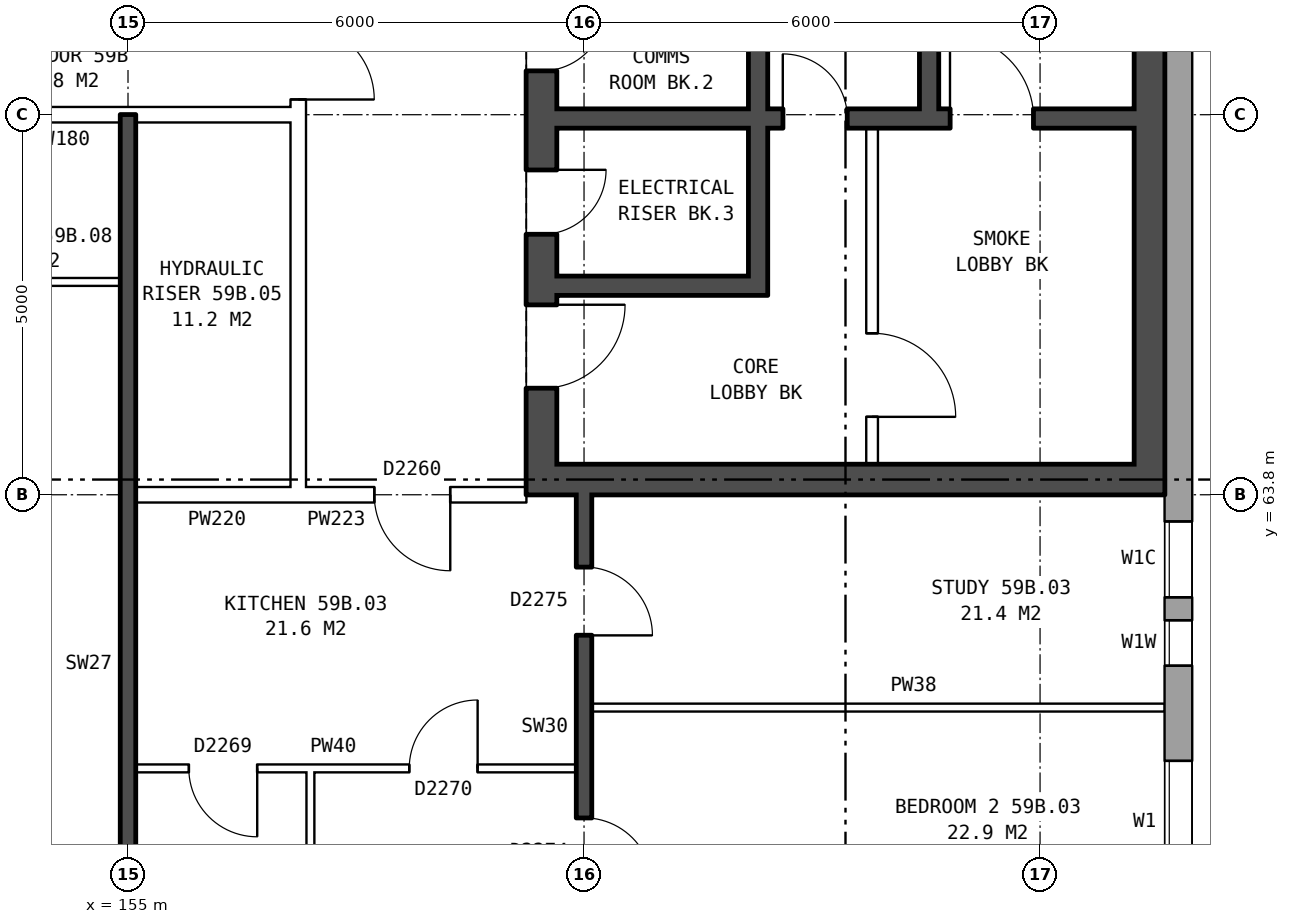
"""IFC4 building model, lengths in metres.
Left out: names, types, materials, properties, quantities, classifications, styles, units other than length and angle.
Written with IfcOpenShell. Run it as: python <this file> out.ifc"""

import sys

from ifc_helpers import new_model, si_unit, direction, frame, frame_2d, origin, place, context, subcontext, project, spatial, rectangle, extrude, element, fill, save


model = new_model("IFC4")
c1 = context("Model", 3, precision=1e-05, world=origin(), true_north=direction((0.0, 1.0)))
c2 = subcontext(c1, "Body", "Model", "MODEL_VIEW")
j1 = project(units=[si_unit("LENGTHUNIT", "METRE"), si_unit("PLANEANGLEUNIT", "RADIAN")], contexts=[c1])
p1 = place(None, origin())
s1 = spatial("IfcSite", under=j1, at=p1, CompositionType="ELEMENT")
p2 = place(p1, origin())
s2 = spatial("IfcBuilding", under=s1, at=p2, CompositionType="ELEMENT")
p3 = place(p2, frame((0.0, 0.0, 209.0)))
s3 = spatial("IfcBuildingStorey", under=s2, at=p3, CompositionType="ELEMENT", Elevation=209.0)
p4 = place(p3, frame((168.82, 57.075, 0.0), z_axis=(0.0, 0.0, 1.0), x_axis=(0.0, 1.0, 0.0)))
e1 = element("IfcWall", 1, at=p4, inside=s3, PredefinedType="STANDARD", context=c2, shape_type="SweptSolid", body=[
    extrude(rectangle(XDim=25.851, YDim=0.36, at=frame_2d((12.925, 0.0))), origin(), (0.0, 0.0, 1.0), 2.85),
])
p5 = place(p4, frame((1.625, 0.0, 0.8)))
e2 = element("IfcOpeningElement", 2, at=p5, cuts=e1, PredefinedType="OPENING", context=c2, shape_type="SweptSolid", body=[
    extrude(rectangle(XDim=1.6, YDim=1.8, at=frame_2d((0.8, 0.9))), frame((0.0, 0.19, 0.0), z_axis=(0.0, -1.0, 0.0), x_axis=(1.0, 0.0, 0.0)), (0.0, 0.0, 1.0), 0.38),
])
p6 = place(p4, frame((4.475, 0.0, 0.15)))
e3 = element("IfcOpeningElement", 3, at=p6, cuts=e1, PredefinedType="OPENING", context=c2, shape_type="SweptSolid", body=[
    extrude(rectangle(XDim=0.6, YDim=0.9, at=frame_2d((0.3, 0.45))), frame((0.0, 0.19, 0.0), z_axis=(0.0, -1.0, 0.0), x_axis=(1.0, 0.0, 0.0)), (0.0, 0.0, 1.0), 0.38),
])
p7 = place(p4, frame((19.425, 0.0, 0.25)))
e4 = element("IfcOpeningElement", 4, at=p7, cuts=e1, PredefinedType="OPENING", context=c2, shape_type="SweptSolid", body=[
    extrude(rectangle(XDim=1.0, YDim=1.8, at=frame_2d((0.5, 0.9))), frame((0.0, 0.19, 0.0), z_axis=(0.0, -1.0, 0.0), x_axis=(1.0, 0.0, 0.0)), (0.0, 0.0, 1.0), 0.38),
])
p8 = place(p4, frame((22.625, 0.0, 0.8)))
e5 = element("IfcOpeningElement", 5, at=p8, cuts=e1, PredefinedType="OPENING", context=c2, shape_type="SweptSolid", body=[
    extrude(rectangle(XDim=1.6, YDim=1.8, at=frame_2d((0.8, 0.9))), frame((0.0, 0.19, 0.0), z_axis=(0.0, -1.0, 0.0), x_axis=(1.0, 0.0, 0.0)), (0.0, 0.0, 1.0), 0.38),
])
p9 = place(p4, frame((5.375, 0.0, 0.15)))
e6 = element("IfcOpeningElement", 6, at=p9, cuts=e1, PredefinedType="OPENING", context=c2, shape_type="SweptSolid", body=[
    extrude(rectangle(XDim=1.0, YDim=1.8, at=frame_2d((0.5, 0.9))), frame((0.0, 0.19, 0.0), z_axis=(0.0, -1.0, 0.0), x_axis=(1.0, 0.0, 0.0)), (0.0, 0.0, 1.0), 0.38),
])
p10 = place(p4, frame((20.725, 0.0, 0.15)))
e7 = element("IfcOpeningElement", 7, at=p10, cuts=e1, PredefinedType="OPENING", context=c2, shape_type="SweptSolid", body=[
    extrude(rectangle(XDim=0.6, YDim=0.9, at=frame_2d((0.3, 0.45))), frame((0.0, 0.19, 0.0), z_axis=(0.0, -1.0, 0.0), x_axis=(1.0, 0.0, 0.0)), (0.0, 0.0, 1.0), 0.38),
])
p11 = place(p3, frame((160.44, 76.2, 0.0), z_axis=(0.0, 0.0, 1.0), x_axis=(0.0, -1.0, 0.0)))
e8 = element("IfcWall", 8, at=p11, inside=s3, PredefinedType="SHEAR", context=c2, shape_type="SweptSolid", body=[
    extrude(rectangle(XDim=12.4, YDim=0.4, at=frame_2d((6.2, 0.0))), origin(), (0.0, 0.0, 1.0), 2.85),
])
p12 = place(p11, frame((1.325, 0.0, 0.0)))
e9 = element("IfcOpeningElement", 9, at=p12, cuts=e8, PredefinedType="OPENING", context=c2, shape_type="SweptSolid", body=[
    extrude(rectangle(XDim=1.1, YDim=2.1, at=frame_2d((0.55, 1.05))), frame((0.0, 0.21, 0.0), z_axis=(0.0, -1.0, 0.0), x_axis=(1.0, 0.0, 0.0)), (0.0, 0.0, 1.0), 0.42),
])
p13 = place(p11, frame((3.825, 0.0, 0.0)))
e10 = element("IfcOpeningElement", 10, at=p13, cuts=e8, PredefinedType="OPENING", context=c2, shape_type="SweptSolid", body=[
    extrude(rectangle(XDim=0.85, YDim=2.1, at=frame_2d((0.425, 1.05))), frame((0.0, 0.21, 0.0), z_axis=(0.0, -1.0, 0.0), x_axis=(1.0, 0.0, 0.0)), (0.0, 0.0, 1.0), 0.42),
])
p14 = place(p11, frame((5.975, 0.0, 0.0)))
e11 = element("IfcOpeningElement", 11, at=p14, cuts=e8, PredefinedType="OPENING", context=c2, shape_type="SweptSolid", body=[
    extrude(rectangle(XDim=0.85, YDim=2.1, at=frame_2d((0.425, 1.05))), frame((0.0, 0.21, 0.0), z_axis=(0.0, -1.0, 0.0), x_axis=(1.0, 0.0, 0.0)), (0.0, 0.0, 1.0), 0.42),
])
p15 = place(p11, frame((9.9, 0.0, 0.0)))
e12 = element("IfcOpeningElement", 12, at=p15, cuts=e8, PredefinedType="OPENING", context=c2, shape_type="SweptSolid", body=[
    extrude(rectangle(XDim=1.1, YDim=2.1, at=frame_2d((0.55, 1.05))), frame((0.0, 0.21, 0.0), z_axis=(0.0, -1.0, 0.0), x_axis=(1.0, 0.0, 0.0)), (0.0, 0.0, 1.0), 0.42),
])
p16 = place(p11, frame((8.125, 0.0, 0.0)))
e13 = element("IfcOpeningElement", 13, at=p16, cuts=e8, PredefinedType="OPENING", context=c2, shape_type="SweptSolid", body=[
    extrude(rectangle(XDim=0.85, YDim=2.1, at=frame_2d((0.425, 1.05))), frame((0.0, 0.21, 0.0), z_axis=(0.0, -1.0, 0.0), x_axis=(1.0, 0.0, 0.0)), (0.0, 0.0, 1.0), 0.42),
])
p17 = place(p3, frame((168.44, 76.2, 0.0), z_axis=(0.0, 0.0, 1.0), x_axis=(0.0, -1.0, 0.0)))
e14 = element("IfcWall", 14, at=p17, inside=s3, PredefinedType="SHEAR", context=c2, shape_type="SweptSolid", body=[
    extrude(rectangle(XDim=12.4, YDim=0.4, at=frame_2d((6.2, 0.0))), origin(), (0.0, 0.0, 1.0), 2.85),
])
p18 = place(p3, frame((160.64, 64.0, 0.0), z_axis=(0.0, 0.0, 1.0), x_axis=(1.0, 0.0, 0.0)))
e15 = element("IfcWall", 15, at=p18, inside=s3, PredefinedType="SHEAR", context=c2, shape_type="SweptSolid", body=[
    extrude(rectangle(XDim=7.6, YDim=0.4, at=frame_2d((3.8, 0.0))), origin(), (0.0, 0.0, 1.0), 2.85),
])
p19 = place(p3, frame((160.64, 68.75, 0.0), z_axis=(0.0, 0.0, 1.0), x_axis=(1.0, 0.0, 0.0)))
e16 = element("IfcWall", 16, at=p19, inside=s3, PredefinedType="SHEAR", context=c2, shape_type="SweptSolid", body=[
    extrude(rectangle(XDim=7.6, YDim=0.25, at=frame_2d((3.8, 0.0))), origin(), (0.0, 0.0, 1.0), 2.85),
])
p20 = place(p19, frame((5.175, 0.0, 0.0)))
e17 = element("IfcOpeningElement", 17, at=p20, cuts=e16, PredefinedType="OPENING", context=c2, shape_type="SweptSolid", body=[
    extrude(rectangle(XDim=1.1, YDim=2.1, at=frame_2d((0.55, 1.05))), frame((0.0, 0.135, 0.0), z_axis=(0.0, -1.0, 0.0), x_axis=(1.0, 0.0, 0.0)), (0.0, 0.0, 1.0), 0.27),
])
p21 = place(p19, frame((2.975, 0.0, 0.0)))
e18 = element("IfcOpeningElement", 18, at=p21, cuts=e16, PredefinedType="OPENING", context=c2, shape_type="SweptSolid", body=[
    extrude(rectangle(XDim=0.85, YDim=2.1, at=frame_2d((0.425, 1.05))), frame((0.0, 0.135, 0.0), z_axis=(0.0, -1.0, 0.0), x_axis=(1.0, 0.0, 0.0)), (0.0, 0.0, 1.0), 0.27),
])
p22 = place(p3, frame((160.64, 66.55, 0.0), z_axis=(0.0, 0.0, 1.0), x_axis=(1.0, 0.0, 0.0)))
e19 = element("IfcWall", 19, at=p22, inside=s3, PredefinedType="SHEAR", context=c2, shape_type="SweptSolid", body=[
    extrude(rectangle(XDim=2.525, YDim=0.25, at=frame_2d((1.263, 0.0))), origin(), (0.0, 0.0, 1.0), 2.85),
])
p23 = place(p3, frame((163.29, 73.025, 0.0), z_axis=(0.0, 0.0, 1.0), x_axis=(0.0, -1.0, 0.0)))
e20 = element("IfcWall", 20, at=p23, inside=s3, PredefinedType="SHEAR", context=c2, shape_type="SweptSolid", body=[
    extrude(rectangle(XDim=4.15, YDim=0.25, at=frame_2d((2.075, 0.0))), origin(), (0.0, 0.0, 1.0), 2.85),
])
p24 = place(p3, frame((163.29, 68.625, 0.0), z_axis=(0.0, 0.0, 1.0), x_axis=(0.0, -1.0, 0.0)))
e21 = element("IfcWall", 21, at=p24, inside=s3, PredefinedType="SHEAR", context=c2, shape_type="SweptSolid", body=[
    extrude(rectangle(XDim=2.2, YDim=0.25, at=frame_2d((1.1, 0.0))), origin(), (0.0, 0.0, 1.0), 2.85),
])
p25 = place(p3, frame((164.79, 68.625, 0.0), z_axis=(0.0, 0.0, 1.0), x_axis=(0.0, -1.0, 0.0)))
e22 = element("IfcWall", 22, at=p25, inside=s3, PredefinedType="PARTITIONING", context=c2, shape_type="SweptSolid", body=[
    extrude(rectangle(XDim=4.425, YDim=0.15, at=frame_2d((2.212, 0.0))), origin(), (0.0, 0.0, 1.0), 2.85),
])
p26 = place(p25, frame((2.7, 0.0, 0.0)))
e23 = element("IfcOpeningElement", 23, at=p26, cuts=e22, PredefinedType="OPENING", context=c2, shape_type="SweptSolid", body=[
    extrude(rectangle(XDim=1.1, YDim=2.1, at=frame_2d((0.55, 1.05))), frame((0.0, 0.085, 0.0), z_axis=(0.0, -1.0, 0.0), x_axis=(1.0, 0.0, 0.0)), (0.0, 0.0, 1.0), 0.17),
])
p27 = place(p3, frame((165.54, 75.8, 0.0), z_axis=(0.0, 0.0, 1.0), x_axis=(0.0, -1.0, 0.0)))
e24 = element("IfcWall", 24, at=p27, inside=s3, PredefinedType="SHEAR", context=c2, shape_type="SweptSolid", body=[
    extrude(rectangle(XDim=6.925, YDim=0.25, at=frame_2d((3.462, 0.0))), origin(), (0.0, 0.0, 1.0), 2.85),
])
p28 = place(p3, frame((157.24, 63.9, 0.0), z_axis=(0.0, 0.0, 1.0), x_axis=(0.0, 1.0, 0.0)))
e25 = element("IfcWall", 25, at=p28, inside=s3, PredefinedType="PARTITIONING", context=c2, shape_type="SweptSolid", body=[
    extrude(rectangle(XDim=12.2, YDim=0.2, at=frame_2d((6.1, 0.0))), origin(), (0.0, 0.0, 1.0), 2.85),
])
p29 = place(p28, frame((5.1, 0.0, 0.0)))
e26 = element("IfcOpeningElement", 26, at=p29, cuts=e25, PredefinedType="OPENING", context=c2, shape_type="SweptSolid", body=[
    extrude(rectangle(XDim=2.0, YDim=2.1, at=frame_2d((1.0, 1.05))), frame((0.0, 0.11, 0.0), z_axis=(0.0, -1.0, 0.0), x_axis=(1.0, 0.0, 0.0)), (0.0, 0.0, 1.0), 0.22),
])
p30 = place(p3, frame((155.1, 60.2, 0.0), z_axis=(0.0, 0.0, 1.0), x_axis=(1.0, 0.0, 0.0)))
e27 = element("IfcWall", 27, at=p30, inside=s3, PredefinedType="PARTITIONING", context=c2, shape_type="SweptSolid", body=[
    extrude(rectangle(XDim=5.8, YDim=0.1, at=frame_2d((2.9, 0.0))), origin(), (0.0, 0.0, 1.0), 2.85),
])
p31 = place(p30, frame((3.6, 0.0, 0.0)))
e28 = element("IfcOpeningElement", 28, at=p31, cuts=e27, PredefinedType="OPENING", context=c2, shape_type="SweptSolid", body=[
    extrude(rectangle(XDim=0.9, YDim=2.1, at=frame_2d((0.45, 1.05))), frame((0.0, 0.06, 0.0), z_axis=(0.0, -1.0, 0.0), x_axis=(1.0, 0.0, 0.0)), (0.0, 0.0, 1.0), 0.12),
])
p32 = place(p30, frame((0.7, 0.0, 0.0)))
e29 = element("IfcOpeningElement", 29, at=p32, cuts=e27, PredefinedType="OPENING", context=c2, shape_type="SweptSolid", body=[
    extrude(rectangle(XDim=0.9, YDim=2.1, at=frame_2d((0.45, 1.05))), frame((0.0, 0.06, 0.0), z_axis=(0.0, -1.0, 0.0), x_axis=(1.0, 0.0, 0.0)), (0.0, 0.0, 1.0), 0.12),
])
p33 = place(p3, frame((161.1, 61.0, 0.0), z_axis=(0.0, 0.0, 1.0), x_axis=(1.0, 0.0, 0.0)))
e30 = element("IfcWall", 30, at=p33, inside=s3, PredefinedType="PARTITIONING", context=c2, shape_type="SweptSolid", body=[
    extrude(rectangle(XDim=7.54, YDim=0.1, at=frame_2d((3.77, 0.0))), origin(), (0.0, 0.0, 1.0), 2.85),
])
p34 = place(p3, frame((155.1, 63.8, 0.0), z_axis=(0.0, 0.0, 1.0), x_axis=(1.0, 0.0, 0.0)))
e31 = element("IfcWall", 31, at=p34, inside=s3, PredefinedType="PARTITIONING", context=c2, shape_type="SweptSolid", body=[
    extrude(rectangle(XDim=2.14, YDim=0.2, at=frame_2d((1.07, 0.0))), origin(), (0.0, 0.0, 1.0), 2.85),
])
p35 = place(p3, frame((157.24, 63.8, 0.0), z_axis=(0.0, 0.0, 1.0), x_axis=(1.0, 0.0, 0.0)))
e32 = element("IfcWall", 32, at=p35, inside=s3, PredefinedType="PARTITIONING", context=c2, shape_type="SweptSolid", body=[
    extrude(rectangle(XDim=3.0, YDim=0.2, at=frame_2d((1.5, 0.0))), origin(), (0.0, 0.0, 1.0), 2.85),
])
p36 = place(p35, frame((1.0, 0.0, 0.0)))
e33 = element("IfcOpeningElement", 33, at=p36, cuts=e32, PredefinedType="OPENING", context=c2, shape_type="SweptSolid", body=[
    extrude(rectangle(XDim=1.0, YDim=2.1, at=frame_2d((0.5, 1.05))), frame((0.0, 0.11, 0.0), z_axis=(0.0, -1.0, 0.0), x_axis=(1.0, 0.0, 0.0)), (0.0, 0.0, 1.0), 0.22),
])
p37 = place(p3, frame((152.0, 66.6, 0.0), z_axis=(0.0, 0.0, 1.0), x_axis=(1.0, 0.0, 0.0)))
e34 = element("IfcWall", 34, at=p37, inside=s3, PredefinedType="PARTITIONING", context=c2, shape_type="SweptSolid", body=[
    extrude(rectangle(XDim=2.9, YDim=0.1, at=frame_2d((1.45, 0.0))), origin(), (0.0, 0.0, 1.0), 2.85),
])
p38 = place(p3, frame((142.76, 68.8, 0.0), z_axis=(0.0, 0.0, 1.0), x_axis=(1.0, 0.0, 0.0)))
e35 = element("IfcWall", 35, at=p38, inside=s3, PredefinedType="PARTITIONING", context=c2, shape_type="SweptSolid", body=[
    extrude(rectangle(XDim=14.48, YDim=0.2, at=frame_2d((7.24, 0.0))), origin(), (0.0, 0.0, 1.0), 2.85),
])
p39 = place(p38, frame((4.24, 0.0, 0.0)))
e36 = element("IfcOpeningElement", 36, at=p39, cuts=e35, PredefinedType="OPENING", context=c2, shape_type="SweptSolid", body=[
    extrude(rectangle(XDim=1.0, YDim=2.1, at=frame_2d((0.5, 1.05))), frame((0.0, 0.11, 0.0), z_axis=(0.0, -1.0, 0.0), x_axis=(1.0, 0.0, 0.0)), (0.0, 0.0, 1.0), 0.22),
])
p40 = place(p38, frame((7.24, 0.0, 0.0)))
e37 = element("IfcOpeningElement", 37, at=p40, cuts=e35, PredefinedType="OPENING", context=c2, shape_type="SweptSolid", body=[
    extrude(rectangle(XDim=1.0, YDim=2.1, at=frame_2d((0.5, 1.05))), frame((0.0, 0.11, 0.0), z_axis=(0.0, -1.0, 0.0), x_axis=(1.0, 0.0, 0.0)), (0.0, 0.0, 1.0), 0.22),
])
p41 = place(p3, frame((155.0, 54.36, 0.0), z_axis=(0.0, 0.0, 1.0), x_axis=(0.0, 1.0, 0.0)))
e38 = element("IfcWall", 38, at=p41, inside=s3, PredefinedType="SOLIDWALL", context=c2, shape_type="SweptSolid", body=[
    extrude(rectangle(XDim=14.44, YDim=0.2, at=frame_2d((7.22, 0.0))), origin(), (0.0, 0.0, 1.0), 2.85),
])
p42 = place(p3, frame((157.4, 57.85, 0.0), z_axis=(0.0, 0.0, 1.0), x_axis=(0.0, 1.0, 0.0)))
e39 = element("IfcWall", 39, at=p42, inside=s3, PredefinedType="PARTITIONING", context=c2, shape_type="SweptSolid", body=[
    extrude(rectangle(XDim=2.3, YDim=0.1, at=frame_2d((1.15, 0.0))), origin(), (0.0, 0.0, 1.0), 2.85),
])
p43 = place(p3, frame((161.0, 54.36, 0.0), z_axis=(0.0, 0.0, 1.0), x_axis=(0.0, 1.0, 0.0)))
e40 = element("IfcWall", 40, at=p43, inside=s3, PredefinedType="SOLIDWALL", context=c2, shape_type="SweptSolid", body=[
    extrude(rectangle(XDim=9.44, YDim=0.2, at=frame_2d((4.72, 0.0))), origin(), (0.0, 0.0, 1.0), 2.85),
])
p44 = place(p43, frame((1.37, 0.0, 0.0)))
e41 = element("IfcOpeningElement", 41, at=p44, cuts=e40, PredefinedType="OPENING", context=c2, shape_type="SweptSolid", body=[
    extrude(rectangle(XDim=0.9, YDim=2.1, at=frame_2d((0.45, 1.05))), frame((0.0, 0.11, 0.0), z_axis=(0.0, -1.0, 0.0), x_axis=(1.0, 0.0, 0.0)), (0.0, 0.0, 1.0), 0.22),
])
p45 = place(p43, frame((4.29, 0.0, 0.0)))
e42 = element("IfcOpeningElement", 42, at=p45, cuts=e40, PredefinedType="OPENING", context=c2, shape_type="SweptSolid", body=[
    extrude(rectangle(XDim=0.9, YDim=2.1, at=frame_2d((0.45, 1.05))), frame((0.0, 0.11, 0.0), z_axis=(0.0, -1.0, 0.0), x_axis=(1.0, 0.0, 0.0)), (0.0, 0.0, 1.0), 0.22),
])
p46 = place(p43, frame((7.59, 0.0, 0.0)))
e43 = element("IfcOpeningElement", 43, at=p46, cuts=e40, PredefinedType="OPENING", context=c2, shape_type="SweptSolid", body=[
    extrude(rectangle(XDim=0.9, YDim=2.1, at=frame_2d((0.45, 1.05))), frame((0.0, 0.11, 0.0), z_axis=(0.0, -1.0, 0.0), x_axis=(1.0, 0.0, 0.0)), (0.0, 0.0, 1.0), 0.22),
])
p47 = place(p5, origin())
e44 = element("IfcWindow", 44, at=p47, inside=s3, PartitioningType="SINGLE_PANEL", PredefinedType="WINDOW", context=c2, shape_type="SweptSolid", body=[
    extrude(rectangle(XDim=1.6, YDim=1.8, at=frame_2d((0.8, 0.9))), frame((0.0, 0.15, 0.0), z_axis=(0.0, -1.0, 0.0), x_axis=(1.0, 0.0, 0.0)), (0.0, 0.0, 1.0), 0.06),
])
fill(e2, e44)
p48 = place(p6, origin())
e45 = element("IfcWindow", 45, at=p48, inside=s3, PartitioningType="SINGLE_PANEL", PredefinedType="WINDOW", context=c2, shape_type="SweptSolid", body=[
    extrude(rectangle(XDim=0.6, YDim=0.9, at=frame_2d((0.3, 0.45))), frame((0.0, 0.15, 0.0), z_axis=(0.0, -1.0, 0.0), x_axis=(1.0, 0.0, 0.0)), (0.0, 0.0, 1.0), 0.06),
])
fill(e3, e45)
p49 = place(p14, origin())
e46 = element("IfcDoor", 46, at=p49, inside=s3, OperationType="SINGLE_SWING_LEFT", PredefinedType="DOOR", context=c2, shape_type="SweptSolid", body=[
    extrude(rectangle(XDim=0.85, YDim=2.1, at=frame_2d((0.425, 1.05))), frame((0.0, 0.185, 0.0), z_axis=(0.0, -1.0, 0.0), x_axis=(1.0, 0.0, 0.0)), (0.0, 0.0, 1.0), 0.05),
])
fill(e11, e46)
p50 = place(p15, origin())
e47 = element("IfcDoor", 47, at=p50, inside=s3, OperationType="SINGLE_SWING_LEFT", PredefinedType="DOOR", context=c2, shape_type="SweptSolid", body=[
    extrude(rectangle(XDim=1.1, YDim=2.1, at=frame_2d((0.55, 1.05))), frame((0.0, 0.185, 0.0), z_axis=(0.0, -1.0, 0.0), x_axis=(1.0, 0.0, 0.0)), (0.0, 0.0, 1.0), 0.05),
])
fill(e12, e47)
p51 = place(p26, origin())
e48 = element("IfcDoor", 48, at=p51, inside=s3, OperationType="SINGLE_SWING_RIGHT", PredefinedType="DOOR", context=c2, shape_type="SweptSolid", body=[
    extrude(rectangle(XDim=1.1, YDim=2.1, at=frame_2d((0.55, 1.05))), frame((0.0, 0.025, 0.0), z_axis=(0.0, -1.0, 0.0), x_axis=(1.0, 0.0, 0.0)), (0.0, 0.0, 1.0), 0.05),
])
fill(e23, e48)
p52 = place(p20, origin())
e49 = element("IfcDoor", 49, at=p52, inside=s3, OperationType="SINGLE_SWING_LEFT", PredefinedType="DOOR", context=c2, shape_type="SweptSolid", body=[
    extrude(rectangle(XDim=1.1, YDim=2.1, at=frame_2d((0.55, 1.05))), frame((0.0, 0.025, 0.0), z_axis=(0.0, -1.0, 0.0), x_axis=(1.0, 0.0, 0.0)), (0.0, 0.0, 1.0), 0.05),
])
fill(e17, e49)
p53 = place(p16, origin())
e50 = element("IfcDoor", 50, at=p53, inside=s3, OperationType="SINGLE_SWING_LEFT", PredefinedType="DOOR", context=c2, shape_type="SweptSolid", body=[
    extrude(rectangle(XDim=0.85, YDim=2.1, at=frame_2d((0.425, 1.05))), frame((0.0, 0.185, 0.0), z_axis=(0.0, -1.0, 0.0), x_axis=(1.0, 0.0, 0.0)), (0.0, 0.0, 1.0), 0.05),
])
fill(e13, e50)
p54 = place(p21, origin())
e51 = element("IfcDoor", 51, at=p54, inside=s3, OperationType="SINGLE_SWING_LEFT", PredefinedType="DOOR", context=c2, shape_type="SweptSolid", body=[
    extrude(rectangle(XDim=0.85, YDim=2.1, at=frame_2d((0.425, 1.05))), frame((0.0, 0.025, 0.0), z_axis=(0.0, -1.0, 0.0), x_axis=(1.0, 0.0, 0.0)), (0.0, 0.0, 1.0), 0.05),
])
fill(e18, e51)
p55 = place(p29, frame((2.0, 0.0, 0.0), z_axis=(0.0, 0.0, 1.0), x_axis=(-1.0, 0.0, 0.0)))
e52 = element("IfcDoor", 52, at=p55, inside=s3, OperationType="DOUBLE_DOOR_SINGLE_SWING", PredefinedType="DOOR", context=c2, shape_type="SweptSolid", body=[
    extrude(rectangle(XDim=2.0, YDim=2.1, at=frame_2d((1.0, 1.05))), frame((0.0, 0.025, 0.0), z_axis=(0.0, -1.0, 0.0), x_axis=(1.0, 0.0, 0.0)), (0.0, 0.0, 1.0), 0.05),
])
fill(e26, e52)
p56 = place(p45, frame((0.9, 0.0, 0.0), z_axis=(0.0, 0.0, 1.0), x_axis=(-1.0, 0.0, 0.0)))
e53 = element("IfcDoor", 53, at=p56, inside=s3, OperationType="SINGLE_SWING_RIGHT", PredefinedType="DOOR", context=c2, shape_type="SweptSolid", body=[
    extrude(rectangle(XDim=0.9, YDim=2.1, at=frame_2d((0.45, 1.05))), frame((0.0, 0.025, 0.0), z_axis=(0.0, -1.0, 0.0), x_axis=(1.0, 0.0, 0.0)), (0.0, 0.0, 1.0), 0.05),
])
fill(e42, e53)
p57 = place(p46, frame((0.9, 0.0, 0.0), z_axis=(0.0, 0.0, 1.0), x_axis=(-1.0, 0.0, 0.0)))
e54 = element("IfcDoor", 54, at=p57, inside=s3, OperationType="SINGLE_SWING_RIGHT", PredefinedType="DOOR", context=c2, shape_type="SweptSolid", body=[
    extrude(rectangle(XDim=0.9, YDim=2.1, at=frame_2d((0.45, 1.05))), frame((0.0, 0.025, 0.0), z_axis=(0.0, -1.0, 0.0), x_axis=(1.0, 0.0, 0.0)), (0.0, 0.0, 1.0), 0.05),
])
fill(e43, e54)
p58 = place(p36, frame((1.0, 0.0, 0.0), z_axis=(0.0, 0.0, 1.0), x_axis=(-1.0, 0.0, 0.0)))
e55 = element("IfcDoor", 55, at=p58, inside=s3, OperationType="SINGLE_SWING_LEFT", PredefinedType="DOOR", context=c2, shape_type="SweptSolid", body=[
    extrude(rectangle(XDim=1.0, YDim=2.1, at=frame_2d((0.5, 1.05))), frame((0.0, 0.025, 0.0), z_axis=(0.0, -1.0, 0.0), x_axis=(1.0, 0.0, 0.0)), (0.0, 0.0, 1.0), 0.05),
])
fill(e33, e55)
p59 = place(p31, origin())
e56 = element("IfcDoor", 56, at=p59, inside=s3, OperationType="SINGLE_SWING_RIGHT", PredefinedType="DOOR", context=c2, shape_type="SweptSolid", body=[
    extrude(rectangle(XDim=0.9, YDim=2.1, at=frame_2d((0.45, 1.05))), frame((0.0, 0.025, 0.0), z_axis=(0.0, -1.0, 0.0), x_axis=(1.0, 0.0, 0.0)), (0.0, 0.0, 1.0), 0.05),
])
fill(e28, e56)
p60 = place(p32, frame((0.9, 0.0, 0.0), z_axis=(0.0, 0.0, 1.0), x_axis=(-1.0, 0.0, 0.0)))
e57 = element("IfcDoor", 57, at=p60, inside=s3, OperationType="SINGLE_SWING_LEFT", PredefinedType="DOOR", context=c2, shape_type="SweptSolid", body=[
    extrude(rectangle(XDim=0.9, YDim=2.1, at=frame_2d((0.45, 1.05))), frame((0.0, 0.025, 0.0), z_axis=(0.0, -1.0, 0.0), x_axis=(1.0, 0.0, 0.0)), (0.0, 0.0, 1.0), 0.05),
])
fill(e29, e57)
p61 = place(p9, origin())
e58 = element("IfcWindow", 58, at=p61, inside=s3, PartitioningType="SINGLE_PANEL", PredefinedType="WINDOW", context=c2, shape_type="SweptSolid", body=[
    extrude(rectangle(XDim=1.0, YDim=1.8, at=frame_2d((0.5, 0.9))), frame((0.0, 0.15, 0.0), z_axis=(0.0, -1.0, 0.0), x_axis=(1.0, 0.0, 0.0)), (0.0, 0.0, 1.0), 0.06),
])
fill(e6, e58)
save(model, sys.argv[1])
